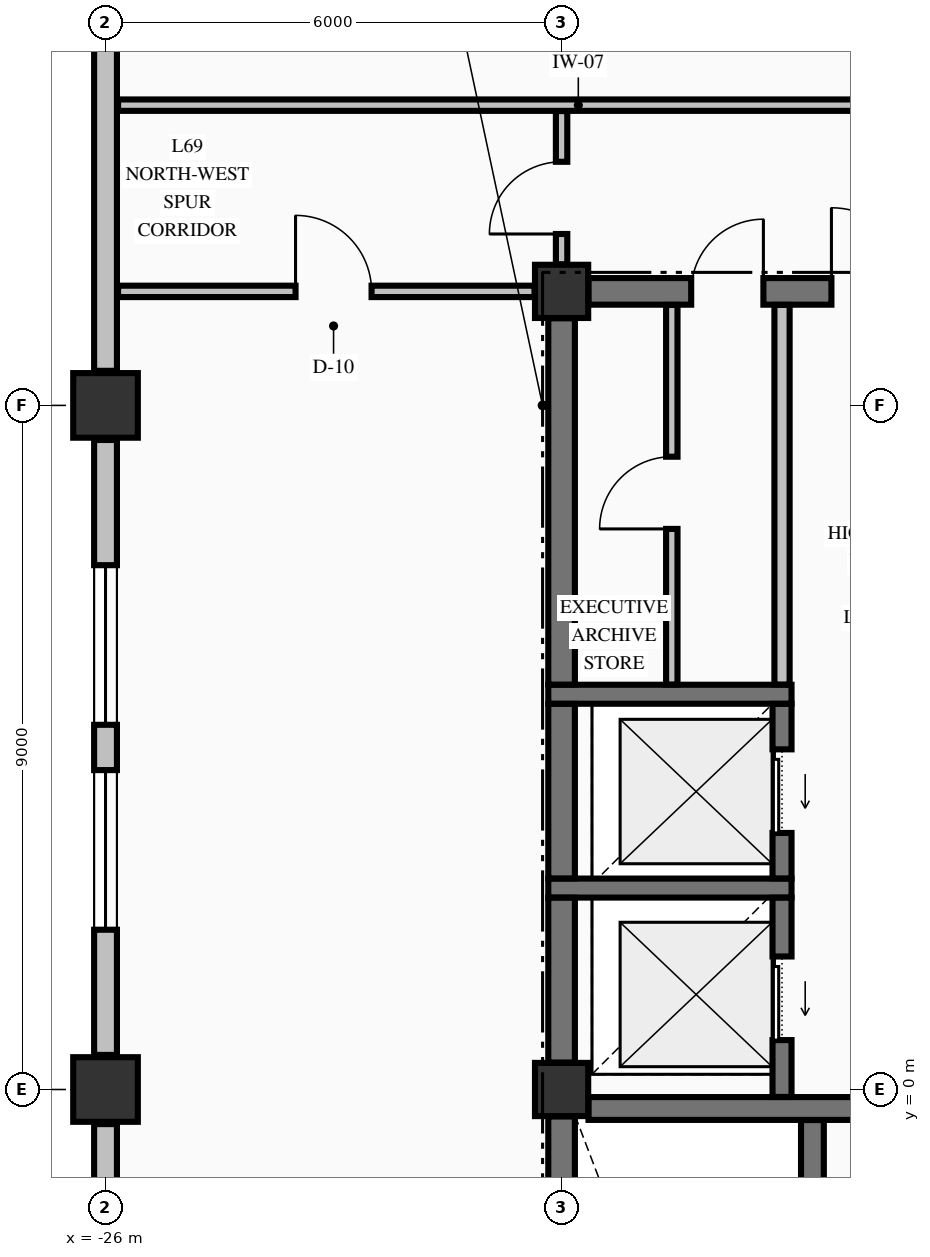
"""IFC4 building model, lengths in metres.
Left out: names, types, materials, properties, quantities, classifications, styles, units other than length and angle.
Written with IfcOpenShell. Run it as: python <this file> out.ifc"""

import sys

from ifc_helpers import new_model, si_unit, direction, frame, frame_2d, origin, origin_2d, place, context, subcontext, project, spatial, rectangle, extrude, element, fill, save


model = new_model("IFC4")
c1 = context("Model", 3, precision=1e-05, world=origin(), true_north=direction((0.0, 1.0)))
c2 = subcontext(c1, "Body", "Model", "MODEL_VIEW")
j1 = project(units=[si_unit("LENGTHUNIT", "METRE"), si_unit("PLANEANGLEUNIT", "RADIAN")], contexts=[c1])
p1 = place(None, origin())
s1 = spatial("IfcSite", under=j1, at=p1, CompositionType="ELEMENT")
p2 = place(p1, origin())
s2 = spatial("IfcBuilding", under=s1, at=p2, CompositionType="ELEMENT")
p3 = place(p2, frame((0.0, 0.0, 260.89)))
s3 = spatial("IfcBuildingStorey", under=s2, at=p3, CompositionType="ELEMENT", Elevation=260.89)
for number, where, z_axis, x_axis in (
    (1, (-26.0, 0.0, -0.25), (0.0, 0.0, 1.0), (1.0, 0.0, 0.0)),
    (2, (-26.0, 9.0, -0.25), (0.0, 0.0, 1.0), (1.0, 0.0, 0.0)),
):
    element("IfcColumn", number, at=place(p3, frame(where, z_axis=z_axis, x_axis=x_axis)), inside=s3, PredefinedType="COLUMN", context=c2, shape_type="SweptSolid", body=[
        extrude(rectangle(XDim=0.85, YDim=0.85, at=origin_2d()), origin(), (0.0, 0.0, 1.0), 3.23),
    ])
for number, where, z_axis, x_axis in (
    (3, (-20.0, 10.5, -0.25), (0.0, 0.0, 1.0), (1.0, 0.0, 0.0)),
    (4, (-20.0, 0.0, -0.25), (0.0, 0.0, 1.0), (1.0, 0.0, 0.0)),
):
    element("IfcColumn", number, at=place(p3, frame(where, z_axis=z_axis, x_axis=x_axis)), inside=s3, PredefinedType="COLUMN", context=c2, shape_type="SweptSolid", body=[
        extrude(rectangle(XDim=0.7, YDim=0.7, at=origin_2d()), origin(), (0.0, 0.0, 1.0), 3.23),
    ])
p4 = place(p3, frame((-26.0, -0.455, 0.0), z_axis=(0.0, 0.0, 1.0), x_axis=(0.0, -1.0, 0.0)))
e5 = element("IfcWall", 5, at=p4, inside=s3, PredefinedType="STANDARD", context=c2, shape_type="SweptSolid", body=[
    extrude(rectangle(XDim=8.09, YDim=0.3, at=frame_2d((4.045, 0.0))), origin(), (0.0, 0.0, 1.0), 2.372),
])
p5 = place(p4, frame((1.647, 0.0, 0.7)))
e6 = element("IfcOpeningElement", 6, at=p5, cuts=e5, PredefinedType="OPENING", context=c2, shape_type="SweptSolid", body=[
    extrude(rectangle(XDim=2.1, YDim=1.5, at=frame_2d((1.05, 0.75))), frame((0.0, 0.16, 0.0), z_axis=(0.0, -1.0, 0.0), x_axis=(1.0, 0.0, 0.0)), (0.0, 0.0, 1.0), 0.32),
])
p6 = place(p4, frame((4.343, 0.0, 0.7)))
e7 = element("IfcOpeningElement", 7, at=p6, cuts=e5, PredefinedType="OPENING", context=c2, shape_type="SweptSolid", body=[
    extrude(rectangle(XDim=2.1, YDim=1.5, at=frame_2d((1.05, 0.75))), frame((0.0, 0.16, 0.0), z_axis=(0.0, -1.0, 0.0), x_axis=(1.0, 0.0, 0.0)), (0.0, 0.0, 1.0), 0.32),
])
p7 = place(p3, frame((-26.0, 8.545, 0.0), z_axis=(0.0, 0.0, 1.0), x_axis=(0.0, -1.0, 0.0)))
e8 = element("IfcWall", 8, at=p7, inside=s3, PredefinedType="STANDARD", context=c2, shape_type="SweptSolid", body=[
    extrude(rectangle(XDim=8.09, YDim=0.3, at=frame_2d((4.045, 0.0))), origin(), (0.0, 0.0, 1.0), 2.372),
])
p8 = place(p7, frame((1.647, 0.0, 0.7)))
e9 = element("IfcOpeningElement", 9, at=p8, cuts=e8, PredefinedType="OPENING", context=c2, shape_type="SweptSolid", body=[
    extrude(rectangle(XDim=2.1, YDim=1.5, at=frame_2d((1.05, 0.75))), frame((0.0, 0.16, 0.0), z_axis=(0.0, -1.0, 0.0), x_axis=(1.0, 0.0, 0.0)), (0.0, 0.0, 1.0), 0.32),
])
p9 = place(p7, frame((4.343, 0.0, 0.7)))
e10 = element("IfcOpeningElement", 10, at=p9, cuts=e8, PredefinedType="OPENING", context=c2, shape_type="SweptSolid", body=[
    extrude(rectangle(XDim=2.1, YDim=1.5, at=frame_2d((1.05, 0.75))), frame((0.0, 0.16, 0.0), z_axis=(0.0, -1.0, 0.0), x_axis=(1.0, 0.0, 0.0)), (0.0, 0.0, 1.0), 0.32),
])
p10 = place(p3, frame((-26.0, 17.545, 0.0), z_axis=(0.0, 0.0, 1.0), x_axis=(0.0, -1.0, 0.0)))
e11 = element("IfcWall", 11, at=p10, inside=s3, PredefinedType="STANDARD", context=c2, shape_type="SweptSolid", body=[
    extrude(rectangle(XDim=8.09, YDim=0.3, at=frame_2d((4.045, 0.0))), origin(), (0.0, 0.0, 1.0), 2.372),
])
p11 = place(p3, frame((-19.646, -0.25, 0.0), z_axis=(0.0, 0.0, 1.0), x_axis=(1.0, 0.0, 0.0)))
e12 = element("IfcWall", 12, at=p11, inside=s3, PredefinedType="SHEAR", context=c2, shape_type="SweptSolid", body=[
    extrude(rectangle(XDim=8.292, YDim=0.3, at=frame_2d((4.146, 0.0))), origin(), (0.0, 0.0, 1.0), 2.98),
])
p12 = place(p11, frame((5.946, 0.0, 0.0)))
e13 = element("IfcOpeningElement", 13, at=p12, cuts=e12, PredefinedType="OPENING", context=c2, shape_type="SweptSolid", body=[
    extrude(rectangle(XDim=1.1, YDim=2.15, at=frame_2d((0.55, 1.075))), frame((0.0, 0.16, 0.0), z_axis=(0.0, -1.0, 0.0), x_axis=(1.0, 0.0, 0.0)), (0.0, 0.0, 1.0), 0.32),
])
for number, where, z_axis, x_axis in (
    (14, (-20.175, 2.65, 0.0), (0.0, 0.0, 1.0), (1.0, 0.0, 0.0)),
    (15, (-20.175, 5.2, 0.0), (0.0, 0.0, 1.0), (1.0, 0.0, 0.0)),
):
    element("IfcWall", number, at=place(p3, frame(where, z_axis=z_axis, x_axis=x_axis)), inside=s3, PredefinedType="SOLIDWALL", context=c2, shape_type="SweptSolid", body=[
        extrude(rectangle(XDim=3.2, YDim=0.25, at=frame_2d((1.6, 0.0))), origin(), (0.0, 0.0, 1.0), 2.98),
    ])
p13 = place(p3, frame((-19.646, 10.5, 0.0), z_axis=(0.0, 0.0, 1.0), x_axis=(1.0, 0.0, 0.0)))
e16 = element("IfcWall", 16, at=p13, inside=s3, PredefinedType="SHEAR", context=c2, shape_type="SweptSolid", body=[
    extrude(rectangle(XDim=4.946, YDim=0.35, at=frame_2d((2.473, 0.0))), origin(), (0.0, 0.0, 1.0), 2.98),
])
p14 = place(p13, frame((3.196, 0.0, 0.0)))
e17 = element("IfcOpeningElement", 17, at=p14, cuts=e16, PredefinedType="OPENING", context=c2, shape_type="SweptSolid", body=[
    extrude(rectangle(XDim=1.1, YDim=2.15, at=frame_2d((0.55, 1.075))), frame((0.0, 0.185, 0.0), z_axis=(0.0, -1.0, 0.0), x_axis=(1.0, 0.0, 0.0)), (0.0, 0.0, 1.0), 0.37),
])
p15 = place(p13, frame((1.351, 0.0, 0.0)))
e18 = element("IfcOpeningElement", 18, at=p15, cuts=e16, PredefinedType="OPENING", context=c2, shape_type="SweptSolid", body=[
    extrude(rectangle(XDim=0.95, YDim=2.15, at=frame_2d((0.475, 1.075))), frame((0.0, 0.185, 0.0), z_axis=(0.0, -1.0, 0.0), x_axis=(1.0, 0.0, 0.0)), (0.0, 0.0, 1.0), 0.37),
])
p16 = place(p3, frame((-25.835, 10.5, 0.0), z_axis=(0.0, 0.0, 1.0), x_axis=(1.0, 0.0, 0.0)))
e19 = element("IfcWall", 19, at=p16, inside=s3, PredefinedType="PARTITIONING", context=c2, shape_type="SweptSolid", body=[
    extrude(rectangle(XDim=5.479, YDim=0.15, at=frame_2d((2.74, 0.0))), origin(), (0.0, 0.0, 1.0), 2.98),
])
p17 = place(p16, frame((2.335, 0.0, 0.0)))
e20 = element("IfcOpeningElement", 20, at=p17, cuts=e19, PredefinedType="OPENING", context=c2, shape_type="SweptSolid", body=[
    extrude(rectangle(XDim=1.0, YDim=2.15, at=frame_2d((0.5, 1.075))), frame((0.0, 0.085, 0.0), z_axis=(0.0, -1.0, 0.0), x_axis=(1.0, 0.0, 0.0)), (0.0, 0.0, 1.0), 0.17),
])
p18 = place(p3, frame((-25.835, 12.95, 0.0), z_axis=(0.0, 0.0, 1.0), x_axis=(1.0, 0.0, 0.0)))
e21 = element("IfcWall", 21, at=p18, inside=s3, PredefinedType="PARTITIONING", context=c2, shape_type="SweptSolid", body=[
    extrude(rectangle(XDim=45.91, YDim=0.15, at=frame_2d((22.955, 0.0))), origin(), (0.0, 0.0, 1.0), 2.98),
])
p19 = place(p18, frame((12.11, 0.0, 0.0)))
e22 = element("IfcOpeningElement", 22, at=p19, cuts=e21, PredefinedType="OPENING", context=c2, shape_type="SweptSolid", body=[
    extrude(rectangle(XDim=1.05, YDim=2.15, at=frame_2d((0.525, 1.075))), frame((0.0, 0.085, 0.0), z_axis=(0.0, -1.0, 0.0), x_axis=(1.0, 0.0, 0.0)), (0.0, 0.0, 1.0), 0.17),
])
p20 = place(p18, frame((23.71, 0.0, 0.0)))
e23 = element("IfcOpeningElement", 23, at=p20, cuts=e21, PredefinedType="OPENING", context=c2, shape_type="SweptSolid", body=[
    extrude(rectangle(XDim=1.05, YDim=2.15, at=frame_2d((0.525, 1.075))), frame((0.0, 0.085, 0.0), z_axis=(0.0, -1.0, 0.0), x_axis=(1.0, 0.0, 0.0)), (0.0, 0.0, 1.0), 0.17),
])
p21 = place(p18, frame((34.76, 0.0, 0.0)))
e24 = element("IfcOpeningElement", 24, at=p21, cuts=e21, PredefinedType="OPENING", context=c2, shape_type="SweptSolid", body=[
    extrude(rectangle(XDim=1.05, YDim=2.15, at=frame_2d((0.525, 1.075))), frame((0.0, 0.085, 0.0), z_axis=(0.0, -1.0, 0.0), x_axis=(1.0, 0.0, 0.0)), (0.0, 0.0, 1.0), 0.17),
])
p22 = place(p3, frame((-20.0, -9.596, 0.0), z_axis=(0.0, 0.0, 1.0), x_axis=(0.0, 1.0, 0.0)))
e25 = element("IfcWall", 25, at=p22, inside=s3, PredefinedType="SHEAR", context=c2, shape_type="SweptSolid", body=[
    extrude(rectangle(XDim=9.242, YDim=0.35, at=frame_2d((4.621, 0.0))), origin(), (0.0, 0.0, 1.0), 2.98),
])
p23 = place(p3, frame((-20.0, 0.354, 0.0), z_axis=(0.0, 0.0, 1.0), x_axis=(0.0, 1.0, 0.0)))
e26 = element("IfcWall", 26, at=p23, inside=s3, PredefinedType="SHEAR", context=c2, shape_type="SweptSolid", body=[
    extrude(rectangle(XDim=2.169, YDim=0.35, at=frame_2d((1.084, 0.0))), origin(), (0.0, 0.0, 1.0), 2.98),
])
p24 = place(p3, frame((-20.0, 2.777, 0.0), z_axis=(0.0, 0.0, 1.0), x_axis=(0.0, 1.0, 0.0)))
e27 = element("IfcWall", 27, at=p24, inside=s3, PredefinedType="SHEAR", context=c2, shape_type="SweptSolid", body=[
    extrude(rectangle(XDim=2.296, YDim=0.35, at=frame_2d((1.148, 0.0))), origin(), (0.0, 0.0, 1.0), 2.98),
])
p25 = place(p3, frame((-20.0, 5.327, 0.0), z_axis=(0.0, 0.0, 1.0), x_axis=(0.0, 1.0, 0.0)))
e28 = element("IfcWall", 28, at=p25, inside=s3, PredefinedType="SHEAR", context=c2, shape_type="SweptSolid", body=[
    extrude(rectangle(XDim=4.819, YDim=0.35, at=frame_2d((2.41, 0.0))), origin(), (0.0, 0.0, 1.0), 2.98),
])
p26 = place(p3, frame((-17.1, -0.098, 0.0), z_axis=(0.0, 0.0, 1.0), x_axis=(0.0, 1.0, 0.0)))
e29 = element("IfcWall", 29, at=p26, inside=s3, PredefinedType="SOLIDWALL", context=c2, shape_type="SweptSolid", body=[
    extrude(rectangle(XDim=2.621, YDim=0.25, at=frame_2d((1.311, 0.0))), origin(), (0.0, 0.0, 1.0), 2.98),
])
p27 = place(p26, frame((0.748, 0.0, 0.0)))
e30 = element("IfcOpeningElement", 30, at=p27, cuts=e29, PredefinedType="OPENING", context=c2, shape_type="SweptSolid", body=[
    extrude(rectangle(XDim=1.1, YDim=2.2, at=frame_2d((0.55, 1.1))), frame((0.0, 0.135, 0.0), z_axis=(0.0, -1.0, 0.0), x_axis=(1.0, 0.0, 0.0)), (0.0, 0.0, 1.0), 0.27),
])
p28 = place(p3, frame((-17.1, 2.777, 0.0), z_axis=(0.0, 0.0, 1.0), x_axis=(0.0, 1.0, 0.0)))
e31 = element("IfcWall", 31, at=p28, inside=s3, PredefinedType="SOLIDWALL", context=c2, shape_type="SweptSolid", body=[
    extrude(rectangle(XDim=2.296, YDim=0.25, at=frame_2d((1.148, 0.0))), origin(), (0.0, 0.0, 1.0), 2.98),
])
p29 = place(p28, frame((0.598, 0.0, 0.0)))
e32 = element("IfcOpeningElement", 32, at=p29, cuts=e31, PredefinedType="OPENING", context=c2, shape_type="SweptSolid", body=[
    extrude(rectangle(XDim=1.1, YDim=2.2, at=frame_2d((0.55, 1.1))), frame((0.0, 0.135, 0.0), z_axis=(0.0, -1.0, 0.0), x_axis=(1.0, 0.0, 0.0)), (0.0, 0.0, 1.0), 0.27),
])
p30 = place(p3, frame((-16.7, -9.773, 0.0), z_axis=(0.0, 0.0, 1.0), x_axis=(0.0, 1.0, 0.0)))
e33 = element("IfcWall", 33, at=p30, inside=s3, PredefinedType="SHEAR", context=c2, shape_type="SweptSolid", body=[
    extrude(rectangle(XDim=9.371, YDim=0.3, at=frame_2d((4.686, 0.0))), origin(), (0.0, 0.0, 1.0), 2.98),
])
p31 = place(p3, frame((-20.0, 10.856, 0.0), z_axis=(0.0, 0.0, 1.0), x_axis=(0.0, 1.0, 0.0)))
e34 = element("IfcWall", 34, at=p31, inside=s3, PredefinedType="PARTITIONING", context=c2, shape_type="SweptSolid", body=[
    extrude(rectangle(XDim=2.016, YDim=0.15, at=frame_2d((1.008, 0.0))), origin(), (0.0, 0.0, 1.0), 2.98),
])
p32 = place(p31, frame((0.399, 0.0, 0.0)))
e35 = element("IfcOpeningElement", 35, at=p32, cuts=e34, PredefinedType="OPENING", context=c2, shape_type="SweptSolid", body=[
    extrude(rectangle(XDim=0.95, YDim=2.15, at=frame_2d((0.475, 1.075))), frame((0.0, 0.085, 0.0), z_axis=(0.0, -1.0, 0.0), x_axis=(1.0, 0.0, 0.0)), (0.0, 0.0, 1.0), 0.17),
])
p33 = place(p3, frame((-18.55, 5.328, 0.0), z_axis=(0.0, 0.0, 1.0), x_axis=(0.0, 1.0, 0.0)))
e36 = element("IfcWall", 36, at=p33, inside=s3, PredefinedType="PARTITIONING", context=c2, shape_type="SweptSolid", body=[
    extrude(rectangle(XDim=4.994, YDim=0.15, at=frame_2d((2.497, 0.0))), origin(), (0.0, 0.0, 1.0), 2.98),
])
p34 = place(p33, frame((2.047, 0.0, 0.0)))
e37 = element("IfcOpeningElement", 37, at=p34, cuts=e36, PredefinedType="OPENING", context=c2, shape_type="SweptSolid", body=[
    extrude(rectangle(XDim=0.95, YDim=2.15, at=frame_2d((0.475, 1.075))), frame((0.0, 0.085, 0.0), z_axis=(0.0, -1.0, 0.0), x_axis=(1.0, 0.0, 0.0)), (0.0, 0.0, 1.0), 0.17),
])
p35 = place(p3, frame((-17.1, 5.328, 0.0), z_axis=(0.0, 0.0, 1.0), x_axis=(0.0, 1.0, 0.0)))
e38 = element("IfcWall", 38, at=p35, inside=s3, PredefinedType="PARTITIONING", context=c2, shape_type="SweptSolid", body=[
    extrude(rectangle(XDim=4.994, YDim=0.2, at=frame_2d((2.497, 0.0))), origin(), (0.0, 0.0, 1.0), 2.98),
])
p36 = place(p8, origin())
e39 = element("IfcWindow", 39, at=p36, inside=s3, PartitioningType="SINGLE_PANEL", PredefinedType="WINDOW", context=c2, shape_type="SweptSolid", body=[
    extrude(rectangle(XDim=2.1, YDim=1.5, at=frame_2d((1.05, 0.75))), frame((0.0, 0.03, 0.0), z_axis=(0.0, -1.0, 0.0), x_axis=(1.0, 0.0, 0.0)), (0.0, 0.0, 1.0), 0.06),
])
fill(e9, e39)
p37 = place(p9, origin())
e40 = element("IfcWindow", 40, at=p37, inside=s3, PartitioningType="SINGLE_PANEL", PredefinedType="WINDOW", context=c2, shape_type="SweptSolid", body=[
    extrude(rectangle(XDim=2.1, YDim=1.5, at=frame_2d((1.05, 0.75))), frame((0.0, 0.03, 0.0), z_axis=(0.0, -1.0, 0.0), x_axis=(1.0, 0.0, 0.0)), (0.0, 0.0, 1.0), 0.06),
])
fill(e10, e40)
p38 = place(p27, origin())
e41 = element("IfcDoor", 41, at=p38, inside=s3, OperationType="SLIDING_TO_LEFT", PredefinedType="DOOR", context=c2, shape_type="SweptSolid", body=[
    extrude(rectangle(XDim=1.1, YDim=2.2, at=frame_2d((0.55, 1.1))), frame((0.0, 0.025, 0.0), z_axis=(0.0, -1.0, 0.0), x_axis=(1.0, 0.0, 0.0)), (0.0, 0.0, 1.0), 0.05),
])
fill(e30, e41)
p39 = place(p29, origin())
e42 = element("IfcDoor", 42, at=p39, inside=s3, OperationType="SLIDING_TO_LEFT", PredefinedType="DOOR", context=c2, shape_type="SweptSolid", body=[
    extrude(rectangle(XDim=1.1, YDim=2.2, at=frame_2d((0.55, 1.1))), frame((0.0, 0.025, 0.0), z_axis=(0.0, -1.0, 0.0), x_axis=(1.0, 0.0, 0.0)), (0.0, 0.0, 1.0), 0.05),
])
fill(e32, e42)
p40 = place(p14, origin())
e43 = element("IfcDoor", 43, at=p40, inside=s3, OperationType="SINGLE_SWING_LEFT", PredefinedType="DOOR", context=c2, shape_type="SweptSolid", body=[
    extrude(rectangle(XDim=1.1, YDim=2.15, at=frame_2d((0.55, 1.075))), frame((0.0, 0.025, 0.0), z_axis=(0.0, -1.0, 0.0), x_axis=(1.0, 0.0, 0.0)), (0.0, 0.0, 1.0), 0.05),
])
fill(e17, e43)
p41 = place(p15, origin())
e44 = element("IfcDoor", 44, at=p41, inside=s3, OperationType="SINGLE_SWING_RIGHT", PredefinedType="DOOR", context=c2, shape_type="SweptSolid", body=[
    extrude(rectangle(XDim=0.95, YDim=2.15, at=frame_2d((0.475, 1.075))), frame((0.0, 0.025, 0.0), z_axis=(0.0, -1.0, 0.0), x_axis=(1.0, 0.0, 0.0)), (0.0, 0.0, 1.0), 0.05),
])
fill(e18, e44)
p42 = place(p34, origin())
e45 = element("IfcDoor", 45, at=p42, inside=s3, OperationType="SINGLE_SWING_LEFT", PredefinedType="DOOR", context=c2, shape_type="SweptSolid", body=[
    extrude(rectangle(XDim=0.95, YDim=2.15, at=frame_2d((0.475, 1.075))), frame((0.0, 0.025, 0.0), z_axis=(0.0, -1.0, 0.0), x_axis=(1.0, 0.0, 0.0)), (0.0, 0.0, 1.0), 0.05),
])
fill(e37, e45)
p43 = place(p32, origin())
e46 = element("IfcDoor", 46, at=p43, inside=s3, OperationType="SINGLE_SWING_LEFT", PredefinedType="DOOR", context=c2, shape_type="SweptSolid", body=[
    extrude(rectangle(XDim=0.95, YDim=2.15, at=frame_2d((0.475, 1.075))), frame((0.0, 0.025, 0.0), z_axis=(0.0, -1.0, 0.0), x_axis=(1.0, 0.0, 0.0)), (0.0, 0.0, 1.0), 0.05),
])
fill(e35, e46)
p44 = place(p17, origin())
e47 = element("IfcDoor", 47, at=p44, inside=s3, OperationType="SINGLE_SWING_LEFT", PredefinedType="DOOR", context=c2, shape_type="SweptSolid", body=[
    extrude(rectangle(XDim=1.0, YDim=2.15, at=frame_2d((0.5, 1.075))), frame((0.0, 0.025, 0.0), z_axis=(0.0, -1.0, 0.0), x_axis=(1.0, 0.0, 0.0)), (0.0, 0.0, 1.0), 0.05),
])
fill(e20, e47)
save(model, sys.argv[1])
